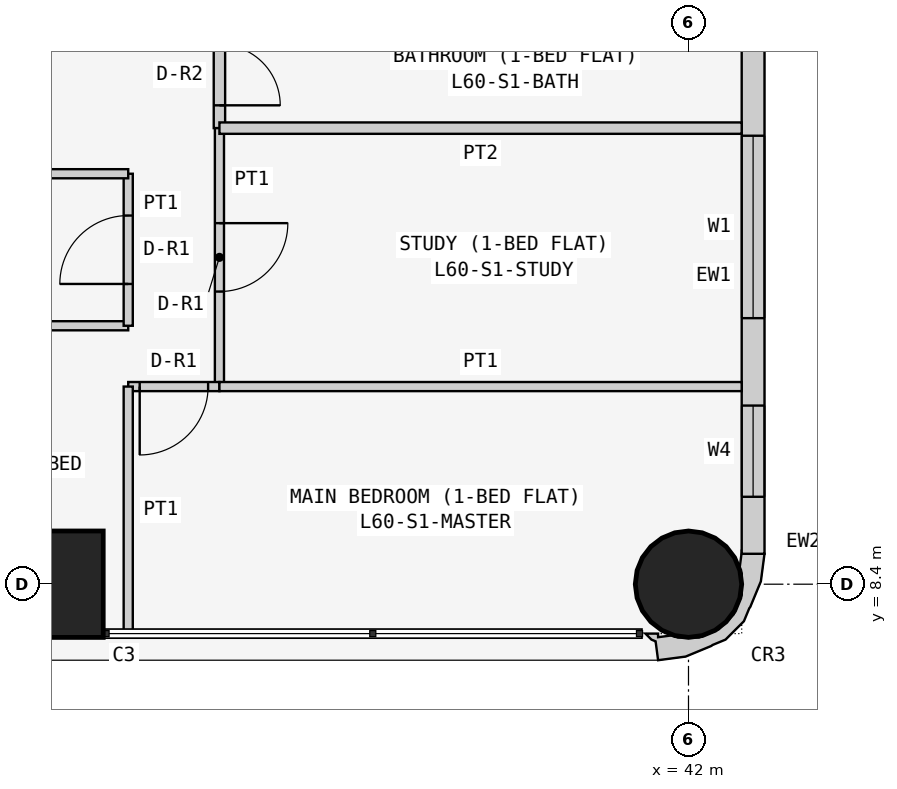
"""IFC4 building model, lengths in metres.
Left out: names, types, materials, properties, quantities, classifications, styles, units other than length and angle.
Written with IfcOpenShell. Run it as: python <this file> out.ifc"""

import sys

from ifc_helpers import new_model, si_unit, direction, frame, frame_2d, origin, origin_2d, place, context, subcontext, project, spatial, polyline, rectangle, circle, outline, extrude, element, fill, save


model = new_model("IFC4")
c1 = context("Model", 3, precision=1e-05, world=origin(), true_north=direction((0.0, 1.0)))
c2 = subcontext(c1, "Body", "Model", "MODEL_VIEW")
j1 = project(units=[si_unit("LENGTHUNIT", "METRE"), si_unit("PLANEANGLEUNIT", "RADIAN")], contexts=[c1])
p1 = place(None, origin())
s1 = spatial("IfcSite", under=j1, at=p1, CompositionType="ELEMENT")
p2 = place(p1, origin())
s2 = spatial("IfcBuilding", under=s1, at=p2, CompositionType="ELEMENT")
p3 = place(p2, frame((0.0, 0.0, 230.1)))
s3 = spatial("IfcBuildingStorey", under=s2, at=p3, CompositionType="ELEMENT", Elevation=230.1)
p4 = place(p3, frame((33.6, 8.4, 0.0), z_axis=(0.0, 0.0, 1.0), x_axis=(1.0, 0.0, 0.0)))
e1 = element("IfcColumn", 1, at=p4, inside=s3, PredefinedType="COLUMN", context=c2, shape_type="SweptSolid", body=[
    extrude(rectangle(XDim=1.4, YDim=1.4, at=origin_2d()), origin(), (0.0, 0.0, 1.0), 3.6),
])
p5 = place(p3, frame((42.0, 8.4, 0.0), z_axis=(0.0, 0.0, 1.0), x_axis=(1.0, 0.0, 0.0)))
e2 = element("IfcColumn", 2, at=p5, inside=s3, PredefinedType="COLUMN", context=c2, shape_type="SweptSolid", body=[
    extrude(circle(Radius=0.7, at=origin_2d()), origin(), (0.0, 0.0, 1.0), 3.6),
])
p6 = place(p3, frame((42.85, 8.8, 0.0), z_axis=(0.0, 0.0, 1.0), x_axis=(0.0, 1.0, 0.0)))
e3 = element("IfcWall", 3, at=p6, inside=s3, PredefinedType="SOLIDWALL", context=c2, shape_type="SweptSolid", body=[
    extrude(rectangle(XDim=7.3, YDim=0.3, at=frame_2d((3.65, 0.0))), origin(), (0.0, 0.0, 1.0), 3.45),
])
p7 = place(p6, frame((3.1, 0.0, 0.9)))
e4 = element("IfcOpeningElement", 4, at=p7, cuts=e3, PredefinedType="OPENING", context=c2, shape_type="SweptSolid", body=[
    extrude(rectangle(XDim=2.4, YDim=1.5, at=frame_2d((1.2, 0.75))), frame((0.0, 0.16, 0.0), z_axis=(0.0, -1.0, 0.0), x_axis=(1.0, 0.0, 0.0)), (0.0, 0.0, 1.0), 0.32),
])
p8 = place(p6, frame((0.75, 0.0, 0.9)))
e5 = element("IfcOpeningElement", 5, at=p8, cuts=e3, PredefinedType="OPENING", context=c2, shape_type="SweptSolid", body=[
    extrude(rectangle(XDim=1.2, YDim=1.5, at=frame_2d((0.6, 0.75))), frame((0.0, 0.16, 0.0), z_axis=(0.0, -1.0, 0.0), x_axis=(1.0, 0.0, 0.0)), (0.0, 0.0, 1.0), 0.32),
])
p9 = place(p3, frame((41.488, 7.812, 0.0), z_axis=(0.0, 0.0, 1.0), x_axis=(0.439933741929, -0.898030234854, 0.0)))
e6 = element("IfcWall", 6, at=p9, inside=s3, PredefinedType="SOLIDWALL", context=c2, shape_type="SweptSolid", body=[
    extrude(outline(polyline([(-0.222, 1.793), (-0.39, 1.541), (-0.372, 1.532), (-0.195, 1.414), (-0.12, 1.41), (0.131, 1.287), (0.315, 1.078), (0.406, 0.814), (0.388, 0.536), (0.265, 0.285), (0.209, 0.235), (0.148, 0.053), (0.105, 0.074), (0.032, -0.076), (0.138, -0.04), (0.182, -0.0), (0.419, -0.08), (0.536, 0.266), (0.559, 0.631), (0.555, 0.651), (0.566, 0.836), (0.455, 1.159), (0.333, 1.298), (0.324, 1.317), (0.082, 1.591), (-0.222, 1.793)])), origin(), (0.0, 0.0, 1.0), 3.45),
])
p10 = place(p3, frame((29.4, 11.8, 0.0), z_axis=(0.0, 0.0, 1.0), x_axis=(1.0, 0.0, 0.0)))
e7 = element("IfcWall", 7, at=p10, inside=s3, PredefinedType="PARTITIONING", context=c2, shape_type="SweptSolid", body=[
    extrude(rectangle(XDim=5.229, YDim=0.12, at=frame_2d((2.615, 0.0))), origin(), (0.0, 0.0, 1.0), 3.45),
])
p11 = place(p3, frame((34.629, 11.8, 0.0), z_axis=(0.0, 0.0, 1.0), x_axis=(0.0, 1.0, 0.0)))
e8 = element("IfcWall", 8, at=p11, inside=s3, PredefinedType="PARTITIONING", context=c2, shape_type="SweptSolid", body=[
    extrude(rectangle(XDim=2.0, YDim=0.12, at=frame_2d((1.0, 0.0))), origin(), (0.0, 0.0, 1.0), 3.45),
])
p12 = place(p11, frame((0.55, 0.0, 0.0)))
e9 = element("IfcOpeningElement", 9, at=p12, cuts=e8, PredefinedType="OPENING", context=c2, shape_type="SweptSolid", body=[
    extrude(rectangle(XDim=0.9, YDim=2.1, at=frame_2d((0.45, 1.05))), frame((0.0, 0.07, 0.0), z_axis=(0.0, -1.0, 0.0), x_axis=(1.0, 0.0, 0.0)), (0.0, 0.0, 1.0), 0.14),
])
p13 = place(p3, frame((34.629, 13.8, 0.0), z_axis=(0.0, 0.0, 1.0), x_axis=(-1.0, 0.0, 0.0)))
e10 = element("IfcWall", 10, at=p13, inside=s3, PredefinedType="PARTITIONING", context=c2, shape_type="SweptSolid", body=[
    extrude(rectangle(XDim=5.229, YDim=0.12, at=frame_2d((2.615, 0.0))), origin(), (0.0, 0.0, 1.0), 3.45),
])
p14 = place(p3, frame((35.829, 15.975, 0.0), z_axis=(0.0, 0.0, 1.0), x_axis=(0.0, -1.0, 0.0)))
e11 = element("IfcWall", 11, at=p14, inside=s3, PredefinedType="PARTITIONING", context=c2, shape_type="SweptSolid", body=[
    extrude(rectangle(XDim=1.575, YDim=0.15, at=frame_2d((0.788, 0.0))), origin(), (0.0, 0.0, 1.0), 3.45),
])
p15 = place(p14, frame((0.475, 0.0, 0.0)))
e12 = element("IfcOpeningElement", 12, at=p15, cuts=e11, PredefinedType="OPENING", context=c2, shape_type="SweptSolid", body=[
    extrude(rectangle(XDim=0.8, YDim=2.1, at=frame_2d((0.4, 1.05))), frame((0.0, 0.085, 0.0), z_axis=(0.0, -1.0, 0.0), x_axis=(1.0, 0.0, 0.0)), (0.0, 0.0, 1.0), 0.17),
])
p16 = place(p3, frame((35.829, 14.4, 0.0), z_axis=(0.0, 0.0, 1.0), x_axis=(0.0, -1.0, 0.0)))
e13 = element("IfcWall", 13, at=p16, inside=s3, PredefinedType="PARTITIONING", context=c2, shape_type="SweptSolid", body=[
    extrude(rectangle(XDim=3.4, YDim=0.12, at=frame_2d((1.7, 0.0))), origin(), (0.0, 0.0, 1.0), 3.45),
])
p17 = place(p16, frame((1.25, 0.0, 0.0)))
e14 = element("IfcOpeningElement", 14, at=p17, cuts=e13, PredefinedType="OPENING", context=c2, shape_type="SweptSolid", body=[
    extrude(rectangle(XDim=0.9, YDim=2.1, at=frame_2d((0.45, 1.05))), frame((0.0, 0.07, 0.0), z_axis=(0.0, -1.0, 0.0), x_axis=(1.0, 0.0, 0.0)), (0.0, 0.0, 1.0), 0.14),
])
p18 = place(p3, frame((35.829, 11.0, 0.0), z_axis=(0.0, 0.0, 1.0), x_axis=(-1.0, 0.0, 0.0)))
e15 = element("IfcWall", 15, at=p18, inside=s3, PredefinedType="PARTITIONING", context=c2, shape_type="SweptSolid", body=[
    extrude(rectangle(XDim=1.2, YDim=0.12, at=frame_2d((0.6, 0.0))), origin(), (0.0, 0.0, 1.0), 3.45),
])
p19 = place(p18, frame((0.149, 0.0, 0.0)))
e16 = element("IfcOpeningElement", 16, at=p19, cuts=e15, PredefinedType="OPENING", context=c2, shape_type="SweptSolid", body=[
    extrude(rectangle(XDim=0.9, YDim=2.1, at=frame_2d((0.45, 1.05))), frame((0.0, 0.07, 0.0), z_axis=(0.0, -1.0, 0.0), x_axis=(1.0, 0.0, 0.0)), (0.0, 0.0, 1.0), 0.14),
])
p20 = place(p3, frame((34.629, 11.0, 0.0), z_axis=(0.0, 0.0, 1.0), x_axis=(0.0, -1.0, 0.0)))
e17 = element("IfcWall", 17, at=p20, inside=s3, PredefinedType="PARTITIONING", context=c2, shape_type="SweptSolid", body=[
    extrude(rectangle(XDim=3.25, YDim=0.12, at=frame_2d((1.625, 0.0))), origin(), (0.0, 0.0, 1.0), 3.45),
])
p21 = place(p3, frame((35.829, 14.4, 0.0), z_axis=(0.0, 0.0, 1.0), x_axis=(1.0, 0.0, 0.0)))
e18 = element("IfcWall", 18, at=p21, inside=s3, PredefinedType="PARTITIONING", context=c2, shape_type="SweptSolid", body=[
    extrude(rectangle(XDim=6.871, YDim=0.15, at=frame_2d((3.436, 0.0))), origin(), (0.0, 0.0, 1.0), 3.45),
])
p22 = place(p3, frame((35.829, 11.0, 0.0), z_axis=(0.0, 0.0, 1.0), x_axis=(1.0, 0.0, 0.0)))
e19 = element("IfcWall", 19, at=p22, inside=s3, PredefinedType="PARTITIONING", context=c2, shape_type="SweptSolid", body=[
    extrude(rectangle(XDim=6.871, YDim=0.12, at=frame_2d((3.436, 0.0))), origin(), (0.0, 0.0, 1.0), 3.45),
])
p23 = place(p7, origin())
e20 = element("IfcWindow", 20, at=p23, inside=s3, PartitioningType="SINGLE_PANEL", PredefinedType="WINDOW", context=c2, shape_type="SweptSolid", body=[
    extrude(rectangle(XDim=2.4, YDim=1.5, at=frame_2d((1.2, 0.75))), frame((0.0, 0.03, 0.0), z_axis=(0.0, -1.0, 0.0), x_axis=(1.0, 0.0, 0.0)), (0.0, 0.0, 1.0), 0.06),
])
fill(e4, e20)
p24 = place(p8, origin())
e21 = element("IfcWindow", 21, at=p24, inside=s3, PartitioningType="SINGLE_PANEL", PredefinedType="WINDOW", context=c2, shape_type="SweptSolid", body=[
    extrude(rectangle(XDim=1.2, YDim=1.5, at=frame_2d((0.6, 0.75))), frame((0.0, 0.03, 0.0), z_axis=(0.0, -1.0, 0.0), x_axis=(1.0, 0.0, 0.0)), (0.0, 0.0, 1.0), 0.06),
])
fill(e5, e21)
p25 = place(p12, origin())
e22 = element("IfcDoor", 22, at=p25, inside=s3, OperationType="SINGLE_SWING_LEFT", PredefinedType="DOOR", context=c2, shape_type="SweptSolid", body=[
    extrude(rectangle(XDim=0.9, YDim=2.1, at=frame_2d((0.45, 1.05))), frame((0.0, 0.025, 0.0), z_axis=(0.0, -1.0, 0.0), x_axis=(1.0, 0.0, 0.0)), (0.0, 0.0, 1.0), 0.05),
])
fill(e9, e22)
p26 = place(p15, origin())
e23 = element("IfcDoor", 23, at=p26, inside=s3, OperationType="SINGLE_SWING_RIGHT", PredefinedType="DOOR", context=c2, shape_type="SweptSolid", body=[
    extrude(rectangle(XDim=0.8, YDim=2.1, at=frame_2d((0.4, 1.05))), frame((0.0, 0.025, 0.0), z_axis=(0.0, -1.0, 0.0), x_axis=(1.0, 0.0, 0.0)), (0.0, 0.0, 1.0), 0.05),
])
fill(e12, e23)
p27 = place(p17, origin())
e24 = element("IfcDoor", 24, at=p27, inside=s3, OperationType="SINGLE_SWING_LEFT", PredefinedType="DOOR", context=c2, shape_type="SweptSolid", body=[
    extrude(rectangle(XDim=0.9, YDim=2.1, at=frame_2d((0.45, 1.05))), frame((0.0, 0.025, 0.0), z_axis=(0.0, -1.0, 0.0), x_axis=(1.0, 0.0, 0.0)), (0.0, 0.0, 1.0), 0.05),
])
fill(e14, e24)
p28 = place(p19, origin())
e25 = element("IfcDoor", 25, at=p28, inside=s3, OperationType="SINGLE_SWING_RIGHT", PredefinedType="DOOR", context=c2, shape_type="SweptSolid", body=[
    extrude(rectangle(XDim=0.9, YDim=2.1, at=frame_2d((0.45, 1.05))), frame((0.0, 0.025, 0.0), z_axis=(0.0, -1.0, 0.0), x_axis=(1.0, 0.0, 0.0)), (0.0, 0.0, 1.0), 0.05),
])
fill(e16, e25)
save(model, sys.argv[1])
